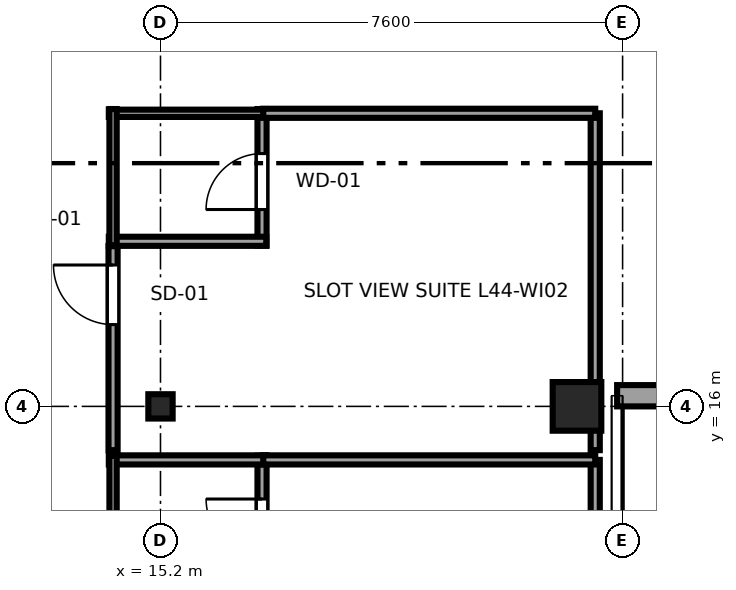
"""IFC4 building model, lengths in metres.
Left out: names, types, materials, properties, quantities, classifications, styles, units other than length and angle.
Written with IfcOpenShell. Run it as: python <this file> out.ifc"""

import sys

from ifc_helpers import new_model, si_unit, direction, frame, frame_2d, origin, origin_2d, place, context, subcontext, project, spatial, rectangle, i_section, extrude, source, transform, mapped, element, fill, save


model = new_model("IFC4")
c1 = context("Model", 3, precision=1e-05, world=origin(), true_north=direction((0.0, 1.0)))
c2 = subcontext(c1, "Body", "Model", "MODEL_VIEW")
j1 = project(units=[si_unit("LENGTHUNIT", "METRE"), si_unit("PLANEANGLEUNIT", "RADIAN")], contexts=[c1])
p1 = place(None, origin())
s1 = spatial("IfcSite", under=j1, at=p1, CompositionType="ELEMENT")
p2 = place(p1, origin())
s2 = spatial("IfcBuilding", under=s1, at=p2, CompositionType="ELEMENT")
p3 = place(p2, frame((0.0, 0.0, 168.35)))
s3 = spatial("IfcBuildingStorey", under=s2, at=p3, CompositionType="ELEMENT", Elevation=168.35)
m1 = source(origin(), c2, "Body", "SweptSolid", [
    extrude(i_section(OverallWidth=0.4, OverallDepth=0.4, WebThickness=0.02, FlangeThickness=0.035, at=origin_2d()), origin(), (0.0, 0.0, 1.0), 3.55),
])
p4 = place(p3, frame((15.2, 16.0, 0.0), z_axis=(0.0, 0.0, 1.0), x_axis=(1.0, 0.0, 0.0)))
e1 = element("IfcColumn", 1, at=p4, inside=s3, PredefinedType="COLUMN", context=c2, shape_type="MappedRepresentation", body=[
    mapped(m1, transform((0.0, 0.0, 0.0), x_axis=(1.0, 0.0, 0.0), y_axis=(0.0, 1.0, 0.0), z_axis=(0.0, 0.0, 1.0), scale=1.0)),
])
m2 = source(origin(), c2, "Body", "SweptSolid", [
    extrude(rectangle(XDim=0.8, YDim=0.8, at=origin_2d()), origin(), (0.0, 0.0, 1.0), 3.55),
])
p5 = place(p3, frame((22.05, 16.0, 0.0), z_axis=(0.0, 0.0, 1.0), x_axis=(1.0, 0.0, 0.0)))
e2 = element("IfcColumn", 2, at=p5, inside=s3, PredefinedType="COLUMN", context=c2, shape_type="MappedRepresentation", body=[
    mapped(m2, transform((0.0, 0.0, 0.0), x_axis=(1.0, 0.0, 0.0), y_axis=(0.0, 1.0, 0.0), z_axis=(0.0, 0.0, 1.0), scale=1.0)),
])
p6 = place(p3, frame((22.71, 16.175, 0.0), z_axis=(0.0, 0.0, 1.0), x_axis=(1.0, 0.0, 0.0)))
e3 = element("IfcWall", 3, at=p6, inside=s3, PredefinedType="SOLIDWALL", context=c2, shape_type="SweptSolid", body=[
    extrude(rectangle(XDim=11.58, YDim=0.35, at=frame_2d((5.79, 0.0))), origin(), (0.0, 0.0, 1.0), 2.758),
])
p7 = place(p6, frame((1.995, 0.0, 0.68)))
e4 = element("IfcOpeningElement", 4, at=p7, cuts=e3, PredefinedType="OPENING", context=c2, shape_type="SweptSolid", body=[
    extrude(rectangle(XDim=2.4, YDim=1.9, at=frame_2d((1.2, 0.95))), frame((0.0, 0.185, 0.0), z_axis=(0.0, -1.0, 0.0), x_axis=(1.0, 0.0, 0.0)), (0.0, 0.0, 1.0), 0.37),
])
p8 = place(p6, frame((7.185, 0.0, 0.68)))
e5 = element("IfcOpeningElement", 5, at=p8, cuts=e3, PredefinedType="OPENING", context=c2, shape_type="SweptSolid", body=[
    extrude(rectangle(XDim=2.4, YDim=1.9, at=frame_2d((1.2, 0.95))), frame((0.0, 0.185, 0.0), z_axis=(0.0, -1.0, 0.0), x_axis=(1.0, 0.0, 0.0)), (0.0, 0.0, 1.0), 0.37),
])
p9 = place(p3, frame((16.87, 12.983, 0.0), z_axis=(0.0, 0.0, 1.0), x_axis=(0.0, 1.0, 0.0)))
e6 = element("IfcWall", 6, at=p9, inside=s3, PredefinedType="PARTITIONING", context=c2, shape_type="SweptSolid", body=[
    extrude(rectangle(XDim=2.207, YDim=0.15, at=frame_2d((1.104, 0.0))), origin(), (0.0, 0.0, 1.0), 3.37),
])
p10 = place(p9, frame((0.573, 0.0, 0.0)))
e7 = element("IfcOpeningElement", 7, at=p10, cuts=e6, PredefinedType="OPENING", context=c2, shape_type="SweptSolid", body=[
    extrude(rectangle(XDim=0.92, YDim=2.01, at=frame_2d((0.46, 1.005))), frame((0.0, 0.085, 0.0), z_axis=(0.0, -1.0, 0.0), x_axis=(1.0, 0.0, 0.0)), (0.0, 0.0, 1.0), 0.17),
])
p11 = place(p3, frame((14.35, 15.12, 0.0), z_axis=(0.0, 0.0, 1.0), x_axis=(1.0, 0.0, 0.0)))
e8 = element("IfcWall", 8, at=p11, inside=s3, PredefinedType="PARTITIONING", context=c2, shape_type="SweptSolid", body=[
    extrude(rectangle(XDim=2.59, YDim=0.15, at=frame_2d((1.295, 0.0))), origin(), (0.0, 0.0, 1.0), 3.37),
])
p12 = place(p3, frame((14.42, 12.983, 0.0), z_axis=(0.0, 0.0, 1.0), x_axis=(0.0, 1.0, 0.0)))
e9 = element("IfcWall", 9, at=p12, inside=s3, PredefinedType="PLUMBINGWALL", context=c2, shape_type="SweptSolid", body=[
    extrude(rectangle(XDim=2.207, YDim=0.12, at=frame_2d((1.104, 0.0))), origin(), (0.0, 0.0, 1.0), 3.37),
])
p13 = place(p3, frame((16.87, 18.645, 0.0), z_axis=(0.0, 0.0, 1.0), x_axis=(0.0, 1.0, 0.0)))
e10 = element("IfcWall", 10, at=p13, inside=s3, PredefinedType="PARTITIONING", context=c2, shape_type="SweptSolid", body=[
    extrude(rectangle(XDim=2.245, YDim=0.15, at=frame_2d((1.123, 0.0))), origin(), (0.0, 0.0, 1.0), 3.37),
])
p14 = place(p13, frame((0.593, 0.0, 0.0)))
e11 = element("IfcOpeningElement", 11, at=p14, cuts=e10, PredefinedType="OPENING", context=c2, shape_type="SweptSolid", body=[
    extrude(rectangle(XDim=0.92, YDim=2.01, at=frame_2d((0.46, 1.005))), frame((0.0, 0.085, 0.0), z_axis=(0.0, -1.0, 0.0), x_axis=(1.0, 0.0, 0.0)), (0.0, 0.0, 1.0), 0.17),
])
p15 = place(p3, frame((14.35, 18.715, 0.0), z_axis=(0.0, 0.0, 1.0), x_axis=(1.0, 0.0, 0.0)))
e12 = element("IfcWall", 12, at=p15, inside=s3, PredefinedType="PARTITIONING", context=c2, shape_type="SweptSolid", body=[
    extrude(rectangle(XDim=2.59, YDim=0.15, at=frame_2d((1.295, 0.0))), origin(), (0.0, 0.0, 1.0), 3.37),
])
p16 = place(p3, frame((14.35, 20.82, 0.0), z_axis=(0.0, 0.0, 1.0), x_axis=(1.0, 0.0, 0.0)))
e13 = element("IfcWall", 13, at=p16, inside=s3, PredefinedType="PLUMBINGWALL", context=c2, shape_type="SweptSolid", body=[
    extrude(rectangle(XDim=2.59, YDim=0.12, at=frame_2d((1.295, 0.0))), origin(), (0.0, 0.0, 1.0), 3.37),
])
p17 = place(p3, frame((14.42, 18.645, 0.0), z_axis=(0.0, 0.0, 1.0), x_axis=(0.0, 1.0, 0.0)))
e14 = element("IfcWall", 14, at=p17, inside=s3, PredefinedType="PLUMBINGWALL", context=c2, shape_type="SweptSolid", body=[
    extrude(rectangle(XDim=2.245, YDim=0.12, at=frame_2d((1.123, 0.0))), origin(), (0.0, 0.0, 1.0), 3.37),
])
p18 = place(p3, frame((22.35, 9.68, 0.0), z_axis=(0.0, 0.0, 1.0), x_axis=(0.0, 1.0, 0.0)))
e15 = element("IfcWall", 15, at=p18, inside=s3, PredefinedType="PARTITIONING", context=c2, shape_type="SweptSolid", body=[
    extrude(rectangle(XDim=5.44, YDim=0.15, at=frame_2d((2.72, 0.0))), origin(), (0.0, 0.0, 1.0), 3.37),
])
p19 = place(p3, frame((16.89, 15.12, 0.0), z_axis=(0.0, 0.0, 1.0), x_axis=(1.0, 0.0, 0.0)))
e16 = element("IfcWall", 16, at=p19, inside=s3, PredefinedType="PARTITIONING", context=c2, shape_type="SweptSolid", body=[
    extrude(rectangle(XDim=5.46, YDim=0.15, at=frame_2d((2.73, 0.0))), origin(), (0.0, 0.0, 1.0), 3.37),
])
p20 = place(p3, frame((14.42, 15.28, 0.0), z_axis=(0.0, 0.0, 1.0), x_axis=(0.0, 1.0, 0.0)))
e17 = element("IfcWall", 17, at=p20, inside=s3, PredefinedType="PARTITIONING", context=c2, shape_type="SweptSolid", body=[
    extrude(rectangle(XDim=3.355, YDim=0.15, at=frame_2d((1.677, 0.0))), origin(), (0.0, 0.0, 1.0), 3.37),
])
p21 = place(p20, frame((2.065, 0.0, 0.0)))
e18 = element("IfcOpeningElement", 18, at=p21, cuts=e17, PredefinedType="OPENING", context=c2, shape_type="SweptSolid", body=[
    extrude(rectangle(XDim=0.98, YDim=2.12, at=frame_2d((0.49, 1.06))), frame((0.0, 0.085, 0.0), z_axis=(0.0, -1.0, 0.0), x_axis=(1.0, 0.0, 0.0)), (0.0, 0.0, 1.0), 0.17),
])
p22 = place(p3, frame((22.35, 15.28, 0.0), z_axis=(0.0, 0.0, 1.0), x_axis=(0.0, 1.0, 0.0)))
e19 = element("IfcWall", 19, at=p22, inside=s3, PredefinedType="PARTITIONING", context=c2, shape_type="SweptSolid", body=[
    extrude(rectangle(XDim=5.54, YDim=0.15, at=frame_2d((2.77, 0.0))), origin(), (0.0, 0.0, 1.0), 3.37),
])
p23 = place(p3, frame((16.89, 20.82, 0.0), z_axis=(0.0, 0.0, 1.0), x_axis=(1.0, 0.0, 0.0)))
e20 = element("IfcWall", 20, at=p23, inside=s3, PredefinedType="PARTITIONING", context=c2, shape_type="SweptSolid", body=[
    extrude(rectangle(XDim=5.46, YDim=0.15, at=frame_2d((2.73, 0.0))), origin(), (0.0, 0.0, 1.0), 3.37),
])
m3 = source(origin(), c2, "Body", "SweptSolid", [
    extrude(rectangle(XDim=0.92, YDim=2.01, at=frame_2d((0.46, 1.005))), frame((0.0, 0.025, 0.0), z_axis=(0.0, -1.0, 0.0), x_axis=(1.0, 0.0, 0.0)), (0.0, 0.0, 1.0), 0.05),
])
p24 = place(p10, origin())
e21 = element("IfcDoor", 21, at=p24, inside=s3, OperationType="SINGLE_SWING_RIGHT", PredefinedType="DOOR", context=c2, shape_type="MappedRepresentation", body=[
    mapped(m3, transform((0.0, 0.0, 0.0), x_axis=(1.0, 0.0, 0.0), y_axis=(0.0, 1.0, 0.0), z_axis=(0.0, 0.0, 1.0), scale=1.0)),
])
fill(e7, e21)
p25 = place(p14, origin())
e22 = element("IfcDoor", 22, at=p25, inside=s3, OperationType="SINGLE_SWING_LEFT", PredefinedType="DOOR", context=c2, shape_type="MappedRepresentation", body=[
    mapped(m3, transform((0.0, 0.0, 0.0), x_axis=(1.0, 0.0, 0.0), y_axis=(0.0, 1.0, 0.0), z_axis=(0.0, 0.0, 1.0), scale=1.0)),
])
fill(e11, e22)
m4 = source(origin(), c2, "Body", "SweptSolid", [
    extrude(rectangle(XDim=0.98, YDim=2.12, at=frame_2d((0.49, 1.06))), frame((0.0, 0.025, 0.0), z_axis=(0.0, -1.0, 0.0), x_axis=(1.0, 0.0, 0.0)), (0.0, 0.0, 1.0), 0.05),
])
p26 = place(p21, origin())
e23 = element("IfcDoor", 23, at=p26, inside=s3, OperationType="SINGLE_SWING_RIGHT", PredefinedType="DOOR", context=c2, shape_type="MappedRepresentation", body=[
    mapped(m4, transform((0.0, 0.0, 0.0), x_axis=(1.0, 0.0, 0.0), y_axis=(0.0, 1.0, 0.0), z_axis=(0.0, 0.0, 1.0), scale=1.0)),
])
fill(e18, e23)
save(model, sys.argv[1])
